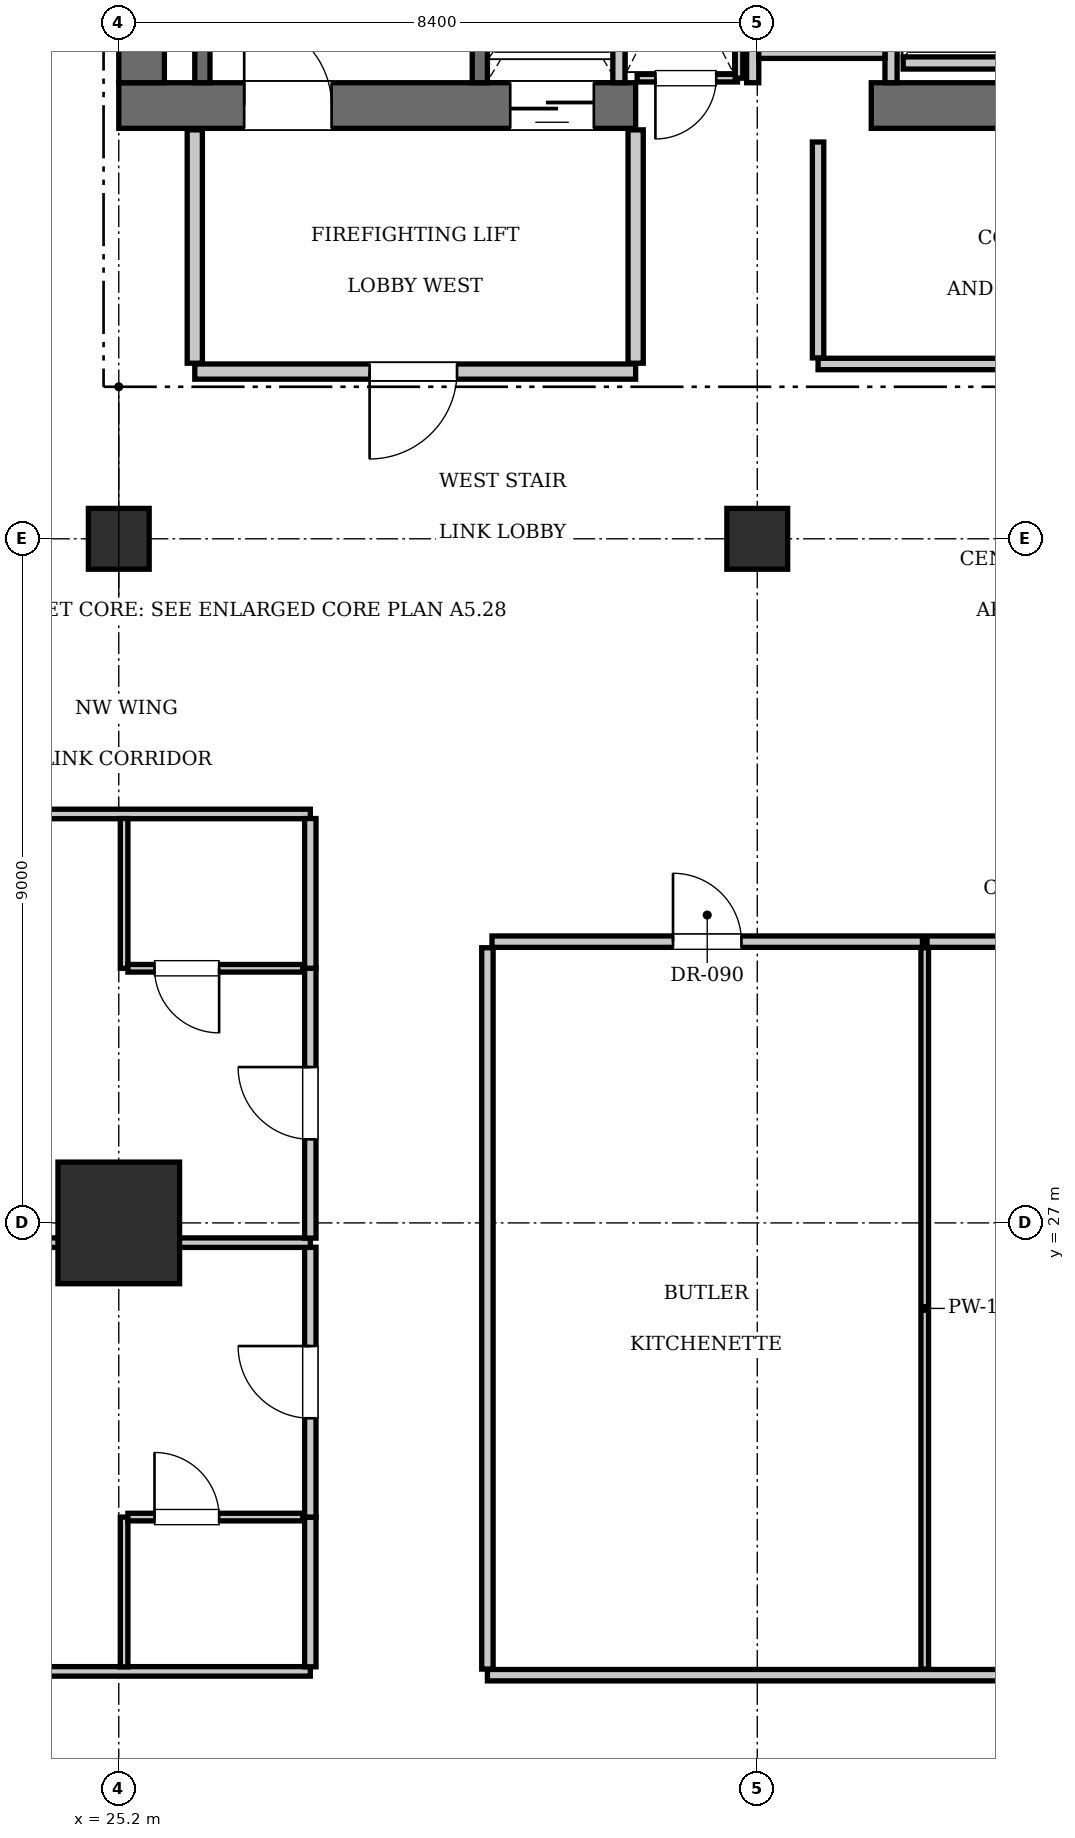
"""IFC4 building model, lengths in metres.
Left out: names, types, materials, properties, quantities, classifications, styles, units other than length and angle.
Written with IfcOpenShell. Run it as: python <this file> out.ifc"""

import sys

from ifc_helpers import new_model, si_unit, direction, frame, frame_2d, origin, origin_2d, place, context, subcontext, project, spatial, rectangle, extrude, element, fill, save


model = new_model("IFC4")
c1 = context("Model", 3, precision=1e-05, world=origin(), true_north=direction((0.0, 1.0)))
c2 = subcontext(c1, "Body", "Model", "MODEL_VIEW")
j1 = project(units=[si_unit("LENGTHUNIT", "METRE"), si_unit("PLANEANGLEUNIT", "RADIAN")], contexts=[c1])
p1 = place(None, origin())
s1 = spatial("IfcSite", under=j1, at=p1, CompositionType="ELEMENT")
p2 = place(p1, origin())
s2 = spatial("IfcBuilding", under=s1, at=p2, CompositionType="ELEMENT")
p3 = place(p2, frame((0.0, 0.0, 247.1)))
s3 = spatial("IfcBuildingStorey", under=s2, at=p3, CompositionType="ELEMENT", Elevation=247.1)
p4 = place(p3, frame((25.2, 27.0, 0.0), z_axis=(0.0, 0.0, 1.0), x_axis=(1.0, 0.0, 0.0)))
e1 = element("IfcColumn", 1, at=p4, inside=s3, PredefinedType="COLUMN", context=c2, shape_type="SweptSolid", body=[
    extrude(rectangle(XDim=1.6, YDim=1.6, at=origin_2d()), origin(), (0.0, 0.0, 1.0), 3.85),
])
p5 = place(p3, frame((25.2, 41.7, 0.0), z_axis=(0.0, 0.0, 1.0), x_axis=(1.0, 0.0, 0.0)))
e2 = element("IfcWall", 2, at=p5, inside=s3, PredefinedType="SHEAR", context=c2, shape_type="SweptSolid", body=[
    extrude(rectangle(XDim=6.8, YDim=0.6, at=frame_2d((3.4, 0.0))), origin(), (0.0, 0.0, 1.0), 3.85),
])
p6 = place(p5, frame((1.65, 0.0, 0.0)))
e3 = element("IfcOpeningElement", 3, at=p6, cuts=e2, PredefinedType="OPENING", context=c2, shape_type="SweptSolid", body=[
    extrude(rectangle(XDim=1.15, YDim=2.15, at=frame_2d((0.575, 1.075))), frame((0.0, 0.31, 0.0), z_axis=(0.0, -1.0, 0.0), x_axis=(1.0, 0.0, 0.0)), (0.0, 0.0, 1.0), 0.62),
])
p7 = place(p5, frame((5.15, 0.0, 0.0)))
e4 = element("IfcOpeningElement", 4, at=p7, cuts=e2, PredefinedType="OPENING", context=c2, shape_type="SweptSolid", body=[
    extrude(rectangle(XDim=1.1, YDim=2.2, at=frame_2d((0.55, 1.1))), frame((0.0, 0.31, 0.0), z_axis=(0.0, -1.0, 0.0), x_axis=(1.0, 0.0, 0.0)), (0.0, 0.0, 1.0), 0.62),
])
p8 = place(p3, frame((35.1, 41.7, 0.0), z_axis=(0.0, 0.0, 1.0), x_axis=(1.0, 0.0, 0.0)))
e5 = element("IfcWall", 5, at=p8, inside=s3, PredefinedType="SHEAR", context=c2, shape_type="SweptSolid", body=[
    extrude(rectangle(XDim=5.4, YDim=0.6, at=frame_2d((2.7, 0.0))), origin(), (0.0, 0.0, 1.0), 3.85),
])
p9 = place(p3, frame((25.5, 42.0, 0.0), z_axis=(0.0, 0.0, 1.0), x_axis=(0.0, 1.0, 0.0)))
e6 = element("IfcWall", 6, at=p9, inside=s3, PredefinedType="SHEAR", context=c2, shape_type="SweptSolid", body=[
    extrude(rectangle(XDim=2.2, YDim=0.6, at=frame_2d((1.1, 0.0))), origin(), (0.0, 0.0, 1.0), 3.85),
])
for number, where, z_axis, x_axis in (
    (7, (25.2, 36.0, 0.0), (0.0, 0.0, 1.0), (1.0, 0.0, 0.0)),
    (8, (33.6, 36.0, 0.0), (0.0, 0.0, 1.0), (1.0, 0.0, 0.0)),
):
    element("IfcColumn", number, at=place(p3, frame(where, z_axis=z_axis, x_axis=x_axis)), inside=s3, PredefinedType="COLUMN", context=c2, shape_type="SweptSolid", body=[
        extrude(rectangle(XDim=0.8, YDim=0.8, at=origin_2d()), origin(), (0.0, 0.0, 1.0), 3.85),
    ])
p10 = place(p3, frame((29.95, 42.0, 0.0), z_axis=(0.0, 0.0, 1.0), x_axis=(0.0, 1.0, 0.0)))
e9 = element("IfcWall", 9, at=p10, inside=s3, PredefinedType="SOLIDWALL", context=c2, shape_type="SweptSolid", body=[
    extrude(rectangle(XDim=9.15, YDim=0.2, at=frame_2d((4.575, 0.0))), origin(), (0.0, 0.0, 1.0), 3.61),
])
p11 = place(p3, frame((26.3, 42.0, 0.0), z_axis=(0.0, 0.0, 1.0), x_axis=(0.0, 1.0, 0.0)))
e10 = element("IfcWall", 10, at=p11, inside=s3, PredefinedType="SOLIDWALL", context=c2, shape_type="SweptSolid", body=[
    extrude(rectangle(XDim=9.12, YDim=0.2, at=frame_2d((4.56, 0.0))), origin(), (0.0, 0.0, 1.0), 3.61),
])
p12 = place(p3, frame((31.78, 42.0, 0.0), z_axis=(0.0, 0.0, 1.0), x_axis=(0.0, 1.0, 0.0)))
e11 = element("IfcWall", 11, at=p12, inside=s3, PredefinedType="SOLIDWALL", context=c2, shape_type="SweptSolid", body=[
    extrude(rectangle(XDim=2.74, YDim=0.16, at=frame_2d((1.37, 0.0))), origin(), (0.0, 0.0, 1.0), 3.61),
])
p13 = place(p3, frame((35.52, 42.26, 0.0), z_axis=(0.0, 0.0, 1.0), x_axis=(1.0, 0.0, 0.0)))
e12 = element("IfcWall", 12, at=p13, inside=s3, PredefinedType="SOLIDWALL", context=c2, shape_type="SweptSolid", body=[
    extrude(rectangle(XDim=5.02, YDim=0.16, at=frame_2d((2.51, 0.0))), origin(), (0.0, 0.0, 1.0), 3.61),
])
for number, where, z_axis, x_axis in (
    (13, (33.54, 42.0, 0.0), (0.0, 0.0, 1.0), (0.0, 1.0, 0.0)),
    (14, (35.36, 42.0, 0.0), (0.0, 0.0, 1.0), (0.0, 1.0, 0.0)),
):
    element("IfcWall", number, at=place(p3, frame(where, z_axis=z_axis, x_axis=x_axis)), inside=s3, PredefinedType="SOLIDWALL", context=c2, shape_type="SweptSolid", body=[
        extrude(rectangle(XDim=2.4, YDim=0.16, at=frame_2d((1.2, 0.0))), origin(), (0.0, 0.0, 1.0), 3.61),
    ])
p14 = place(p3, frame((33.62, 42.4, 0.0), z_axis=(0.0, 0.0, 1.0), x_axis=(1.0, 0.0, 0.0)))
e15 = element("IfcWall", 15, at=p14, inside=s3, PredefinedType="SOLIDWALL", context=c2, shape_type="SweptSolid", body=[
    extrude(rectangle(XDim=1.66, YDim=0.16, at=frame_2d((0.83, 0.0))), origin(), (0.0, 0.0, 1.0), 3.61),
])
p15 = place(p3, frame((26.2, 38.2, 0.0), z_axis=(0.0, 0.0, 1.0), x_axis=(1.0, 0.0, 0.0)))
e16 = element("IfcWall", 16, at=p15, inside=s3, PredefinedType="PARTITIONING", context=c2, shape_type="SweptSolid", body=[
    extrude(rectangle(XDim=5.8, YDim=0.2, at=frame_2d((2.9, 0.0))), origin(), (0.0, 0.0, 1.0), 3.61),
])
p16 = place(p15, frame((2.3, 0.0, 0.0)))
e17 = element("IfcOpeningElement", 17, at=p16, cuts=e16, PredefinedType="OPENING", context=c2, shape_type="SweptSolid", body=[
    extrude(rectangle(XDim=1.15, YDim=2.15, at=frame_2d((0.575, 1.075))), frame((0.0, 0.11, 0.0), z_axis=(0.0, -1.0, 0.0), x_axis=(1.0, 0.0, 0.0)), (0.0, 0.0, 1.0), 0.22),
])
for number, where, z_axis, x_axis in (
    (18, (26.2, 38.31, 0.0), (0.0, 0.0, 1.0), (0.0, 1.0, 0.0)),
    (19, (32.0, 38.31, 0.0), (0.0, 0.0, 1.0), (0.0, 1.0, 0.0)),
):
    element("IfcWall", number, at=place(p3, frame(where, z_axis=z_axis, x_axis=x_axis)), inside=s3, PredefinedType="PARTITIONING", context=c2, shape_type="SweptSolid", body=[
        extrude(rectangle(XDim=3.07, YDim=0.2, at=frame_2d((1.535, 0.0))), origin(), (0.0, 0.0, 1.0), 3.61),
    ])
p17 = place(p3, frame((32.02, 42.06, 0.0), z_axis=(0.0, 0.0, 1.0), x_axis=(1.0, 0.0, 0.0)))
e20 = element("IfcWall", 20, at=p17, inside=s3, PredefinedType="PARTITIONING", context=c2, shape_type="SweptSolid", body=[
    extrude(rectangle(XDim=1.32, YDim=0.1, at=frame_2d((0.66, 0.0))), origin(), (0.0, 0.0, 1.0), 3.61),
])
p18 = place(p17, frame((0.24, 0.0, 0.0)))
e21 = element("IfcOpeningElement", 21, at=p18, cuts=e20, PredefinedType="OPENING", context=c2, shape_type="SweptSolid", body=[
    extrude(rectangle(XDim=0.8, YDim=2.05, at=frame_2d((0.4, 1.025))), frame((0.0, 0.06, 0.0), z_axis=(0.0, -1.0, 0.0), x_axis=(1.0, 0.0, 0.0)), (0.0, 0.0, 1.0), 0.12),
])
p19 = place(p3, frame((33.36, 42.06, 0.0), z_axis=(0.0, 0.0, 1.0), x_axis=(0.0, 1.0, 0.0)))
e22 = element("IfcWall", 22, at=p19, inside=s3, PredefinedType="PARTITIONING", context=c2, shape_type="SweptSolid", body=[
    extrude(rectangle(XDim=2.88, YDim=0.1, at=frame_2d((1.44, 0.0))), origin(), (0.0, 0.0, 1.0), 3.61),
])
p20 = place(p3, frame((34.4, 38.3, 0.0), z_axis=(0.0, 0.0, 1.0), x_axis=(1.0, 0.0, 0.0)))
e23 = element("IfcWall", 23, at=p20, inside=s3, PredefinedType="PARTITIONING", context=c2, shape_type="SweptSolid", body=[
    extrude(rectangle(XDim=5.92, YDim=0.15, at=frame_2d((2.96, 0.0))), origin(), (0.0, 0.0, 1.0), 3.61),
])
p21 = place(p20, frame((2.4, 0.0, 0.0)))
e24 = element("IfcOpeningElement", 24, at=p21, cuts=e23, PredefinedType="OPENING", context=c2, shape_type="SweptSolid", body=[
    extrude(rectangle(XDim=0.9, YDim=2.1, at=frame_2d((0.45, 1.05))), frame((0.0, 0.085, 0.0), z_axis=(0.0, -1.0, 0.0), x_axis=(1.0, 0.0, 0.0)), (0.0, 0.0, 1.0), 0.17),
])
p22 = place(p3, frame((34.4, 38.38, 0.0), z_axis=(0.0, 0.0, 1.0), x_axis=(0.0, 1.0, 0.0)))
e25 = element("IfcWall", 25, at=p22, inside=s3, PredefinedType="PARTITIONING", context=c2, shape_type="SweptSolid", body=[
    extrude(rectangle(XDim=2.84, YDim=0.15, at=frame_2d((1.42, 0.0))), origin(), (0.0, 0.0, 1.0), 3.61),
])
p23 = place(p3, frame((30.05, 21.05, 0.0), z_axis=(0.0, 0.0, 1.0), x_axis=(1.0, 0.0, 0.0)))
e26 = element("IfcWall", 26, at=p23, inside=s3, PredefinedType="PARTITIONING", context=c2, shape_type="SweptSolid", body=[
    extrude(rectangle(XDim=15.55, YDim=0.15, at=frame_2d((7.775, 0.0))), origin(), (0.0, 0.0, 1.0), 3.61),
])
p24 = place(p3, frame((30.05, 21.13, 0.0), z_axis=(0.0, 0.0, 1.0), x_axis=(0.0, 1.0, 0.0)))
e27 = element("IfcWall", 27, at=p24, inside=s3, PredefinedType="PARTITIONING", context=c2, shape_type="SweptSolid", body=[
    extrude(rectangle(XDim=9.49, YDim=0.15, at=frame_2d((4.745, 0.0))), origin(), (0.0, 0.0, 1.0), 3.61),
])
p25 = place(p3, frame((30.11, 30.7, 0.0), z_axis=(0.0, 0.0, 1.0), x_axis=(1.0, 0.0, 0.0)))
e28 = element("IfcWall", 28, at=p25, inside=s3, PredefinedType="PARTITIONING", context=c2, shape_type="SweptSolid", body=[
    extrude(rectangle(XDim=5.663, YDim=0.15, at=frame_2d((2.832, 0.0))), origin(), (0.0, 0.0, 1.0), 3.61),
])
p26 = place(p25, frame((2.382, 0.0, 0.0)))
e29 = element("IfcOpeningElement", 29, at=p26, cuts=e28, PredefinedType="OPENING", context=c2, shape_type="SweptSolid", body=[
    extrude(rectangle(XDim=0.9, YDim=2.1, at=frame_2d((0.45, 1.05))), frame((0.0, 0.085, 0.0), z_axis=(0.0, -1.0, 0.0), x_axis=(1.0, 0.0, 0.0)), (0.0, 0.0, 1.0), 0.17),
])
p27 = place(p3, frame((35.803, 21.13, 0.0), z_axis=(0.0, 0.0, 1.0), x_axis=(0.0, 1.0, 0.0)))
e30 = element("IfcWall", 30, at=p27, inside=s3, PredefinedType="PARTITIONING", context=c2, shape_type="SweptSolid", body=[
    extrude(rectangle(XDim=9.49, YDim=0.1, at=frame_2d((4.745, 0.0))), origin(), (0.0, 0.0, 1.0), 3.61),
])
p28 = place(p3, frame((35.833, 30.7, 0.0), z_axis=(0.0, 0.0, 1.0), x_axis=(1.0, 0.0, 0.0)))
e31 = element("IfcWall", 31, at=p28, inside=s3, PredefinedType="PARTITIONING", context=c2, shape_type="SweptSolid", body=[
    extrude(rectangle(XDim=9.707, YDim=0.15, at=frame_2d((4.853, 0.0))), origin(), (0.0, 0.0, 1.0), 3.61),
])
p29 = place(p28, frame((4.403, 0.0, 0.0)))
e32 = element("IfcOpeningElement", 32, at=p29, cuts=e31, PredefinedType="OPENING", context=c2, shape_type="SweptSolid", body=[
    extrude(rectangle(XDim=0.9, YDim=2.1, at=frame_2d((0.45, 1.05))), frame((0.0, 0.085, 0.0), z_axis=(0.0, -1.0, 0.0), x_axis=(1.0, 0.0, 0.0)), (0.0, 0.0, 1.0), 0.17),
])
for number, where, z_axis, x_axis in (
    (33, (15.5, 21.1, 0.0), (0.0, 0.0, 1.0), (1.0, 0.0, 0.0)),
    (34, (15.5, 32.38, 0.0), (0.0, 0.0, 1.0), (1.0, 0.0, 0.0)),
):
    element("IfcWall", number, at=place(p3, frame(where, z_axis=z_axis, x_axis=x_axis)), inside=s3, PredefinedType="PARTITIONING", context=c2, shape_type="SweptSolid", body=[
        extrude(rectangle(XDim=12.22, YDim=0.125, at=frame_2d((6.11, 0.0))), origin(), (0.0, 0.0, 1.0), 3.61),
    ])
p30 = place(p3, frame((27.72, 21.16, 0.0), z_axis=(0.0, 0.0, 1.0), x_axis=(0.0, 1.0, 0.0)))
e35 = element("IfcWall", 35, at=p30, inside=s3, PredefinedType="PARTITIONING", context=c2, shape_type="SweptSolid", body=[
    extrude(rectangle(XDim=1.97, YDim=0.15, at=frame_2d((0.985, 0.0))), origin(), (0.0, 0.0, 1.0), 3.61),
])
p31 = place(p3, frame((27.72, 23.13, 0.0), z_axis=(0.0, 0.0, 1.0), x_axis=(0.0, 1.0, 0.0)))
e36 = element("IfcWall", 36, at=p31, inside=s3, PredefinedType="PARTITIONING", context=c2, shape_type="SweptSolid", body=[
    extrude(rectangle(XDim=3.55, YDim=0.15, at=frame_2d((1.775, 0.0))), origin(), (0.0, 0.0, 1.0), 3.61),
])
p32 = place(p31, frame((1.3, 0.0, 0.0)))
e37 = element("IfcOpeningElement", 37, at=p32, cuts=e36, PredefinedType="OPENING", context=c2, shape_type="SweptSolid", body=[
    extrude(rectangle(XDim=0.95, YDim=2.15, at=frame_2d((0.475, 1.075))), frame((0.0, 0.085, 0.0), z_axis=(0.0, -1.0, 0.0), x_axis=(1.0, 0.0, 0.0)), (0.0, 0.0, 1.0), 0.17),
])
p33 = place(p3, frame((25.27, 21.16, 0.0), z_axis=(0.0, 0.0, 1.0), x_axis=(0.0, 1.0, 0.0)))
e38 = element("IfcWall", 38, at=p33, inside=s3, PredefinedType="PARTITIONING", context=c2, shape_type="SweptSolid", body=[
    extrude(rectangle(XDim=1.97, YDim=0.1, at=frame_2d((0.985, 0.0))), origin(), (0.0, 0.0, 1.0), 3.077),
])
p34 = place(p3, frame((25.32, 23.13, 0.0), z_axis=(0.0, 0.0, 1.0), x_axis=(1.0, 0.0, 0.0)))
e39 = element("IfcWall", 39, at=p34, inside=s3, PredefinedType="PARTITIONING", context=c2, shape_type="SweptSolid", body=[
    extrude(rectangle(XDim=2.3, YDim=0.1, at=frame_2d((1.15, 0.0))), origin(), (0.0, 0.0, 1.0), 3.61),
])
p35 = place(p34, frame((0.35, 0.0, 0.0)))
e40 = element("IfcOpeningElement", 40, at=p35, cuts=e39, PredefinedType="OPENING", context=c2, shape_type="SweptSolid", body=[
    extrude(rectangle(XDim=0.85, YDim=2.1, at=frame_2d((0.425, 1.05))), frame((0.0, 0.06, 0.0), z_axis=(0.0, -1.0, 0.0), x_axis=(1.0, 0.0, 0.0)), (0.0, 0.0, 1.0), 0.12),
])
p36 = place(p3, frame((15.5, 26.74, 0.0), z_axis=(0.0, 0.0, 1.0), x_axis=(1.0, 0.0, 0.0)))
e41 = element("IfcWall", 41, at=p36, inside=s3, PredefinedType="PARTITIONING", context=c2, shape_type="SweptSolid", body=[
    extrude(rectangle(XDim=12.22, YDim=0.125, at=frame_2d((6.11, 0.0))), origin(), (0.0, 0.0, 1.0), 2.41),
])
p37 = place(p3, frame((27.72, 26.8, 0.0), z_axis=(0.0, 0.0, 1.0), x_axis=(0.0, 1.0, 0.0)))
e42 = element("IfcWall", 42, at=p37, inside=s3, PredefinedType="PARTITIONING", context=c2, shape_type="SweptSolid", body=[
    extrude(rectangle(XDim=3.55, YDim=0.15, at=frame_2d((1.775, 0.0))), origin(), (0.0, 0.0, 1.0), 3.61),
])
p38 = place(p37, frame((1.3, 0.0, 0.0)))
e43 = element("IfcOpeningElement", 43, at=p38, cuts=e42, PredefinedType="OPENING", context=c2, shape_type="SweptSolid", body=[
    extrude(rectangle(XDim=0.95, YDim=2.15, at=frame_2d((0.475, 1.075))), frame((0.0, 0.085, 0.0), z_axis=(0.0, -1.0, 0.0), x_axis=(1.0, 0.0, 0.0)), (0.0, 0.0, 1.0), 0.17),
])
p39 = place(p3, frame((27.72, 30.35, 0.0), z_axis=(0.0, 0.0, 1.0), x_axis=(0.0, 1.0, 0.0)))
e44 = element("IfcWall", 44, at=p39, inside=s3, PredefinedType="PARTITIONING", context=c2, shape_type="SweptSolid", body=[
    extrude(rectangle(XDim=1.97, YDim=0.15, at=frame_2d((0.985, 0.0))), origin(), (0.0, 0.0, 1.0), 3.61),
])
p40 = place(p3, frame((25.27, 30.35, 0.0), z_axis=(0.0, 0.0, 1.0), x_axis=(0.0, 1.0, 0.0)))
e45 = element("IfcWall", 45, at=p40, inside=s3, PredefinedType="PARTITIONING", context=c2, shape_type="SweptSolid", body=[
    extrude(rectangle(XDim=1.97, YDim=0.1, at=frame_2d((0.985, 0.0))), origin(), (0.0, 0.0, 1.0), 3.077),
])
p41 = place(p3, frame((25.32, 30.35, 0.0), z_axis=(0.0, 0.0, 1.0), x_axis=(1.0, 0.0, 0.0)))
e46 = element("IfcWall", 46, at=p41, inside=s3, PredefinedType="PARTITIONING", context=c2, shape_type="SweptSolid", body=[
    extrude(rectangle(XDim=2.3, YDim=0.1, at=frame_2d((1.15, 0.0))), origin(), (0.0, 0.0, 1.0), 3.61),
])
p42 = place(p41, frame((0.35, 0.0, 0.0)))
e47 = element("IfcOpeningElement", 47, at=p42, cuts=e46, PredefinedType="OPENING", context=c2, shape_type="SweptSolid", body=[
    extrude(rectangle(XDim=0.85, YDim=2.1, at=frame_2d((0.425, 1.05))), frame((0.0, 0.06, 0.0), z_axis=(0.0, -1.0, 0.0), x_axis=(1.0, 0.0, 0.0)), (0.0, 0.0, 1.0), 0.12),
])
p43 = place(p6, origin())
e48 = element("IfcDoor", 48, at=p43, inside=s3, OperationType="SINGLE_SWING_LEFT", PredefinedType="DOOR", context=c2, shape_type="SweptSolid", body=[
    extrude(rectangle(XDim=1.15, YDim=2.15, at=frame_2d((0.575, 1.075))), frame((0.0, 0.025, 0.0), z_axis=(0.0, -1.0, 0.0), x_axis=(1.0, 0.0, 0.0)), (0.0, 0.0, 1.0), 0.05),
])
fill(e3, e48)
p44 = place(p7, frame((1.1, 0.0, 0.0), z_axis=(0.0, 0.0, 1.0), x_axis=(-1.0, 0.0, 0.0)))
e49 = element("IfcDoor", 49, at=p44, inside=s3, OperationType="SLIDING_TO_LEFT", PredefinedType="DOOR", context=c2, shape_type="SweptSolid", body=[
    extrude(rectangle(XDim=1.1, YDim=2.2, at=frame_2d((0.55, 1.1))), frame((0.0, 0.025, 0.0), z_axis=(0.0, -1.0, 0.0), x_axis=(1.0, 0.0, 0.0)), (0.0, 0.0, 1.0), 0.05),
])
fill(e4, e49)
p45 = place(p16, frame((1.15, 0.0, 0.0), z_axis=(0.0, 0.0, 1.0), x_axis=(-1.0, 0.0, 0.0)))
e50 = element("IfcDoor", 50, at=p45, inside=s3, OperationType="SINGLE_SWING_RIGHT", PredefinedType="DOOR", context=c2, shape_type="SweptSolid", body=[
    extrude(rectangle(XDim=1.15, YDim=2.15, at=frame_2d((0.575, 1.075))), frame((0.0, 0.025, 0.0), z_axis=(0.0, -1.0, 0.0), x_axis=(1.0, 0.0, 0.0)), (0.0, 0.0, 1.0), 0.05),
])
fill(e17, e50)
p46 = place(p18, frame((0.8, 0.0, 0.0), z_axis=(0.0, 0.0, 1.0), x_axis=(-1.0, 0.0, 0.0)))
e51 = element("IfcDoor", 51, at=p46, inside=s3, OperationType="SINGLE_SWING_RIGHT", PredefinedType="DOOR", context=c2, shape_type="SweptSolid", body=[
    extrude(rectangle(XDim=0.8, YDim=2.05, at=frame_2d((0.4, 1.025))), frame((0.0, 0.025, 0.0), z_axis=(0.0, -1.0, 0.0), x_axis=(1.0, 0.0, 0.0)), (0.0, 0.0, 1.0), 0.05),
])
fill(e21, e51)
p47 = place(p26, origin())
e52 = element("IfcDoor", 52, at=p47, inside=s3, OperationType="SINGLE_SWING_LEFT", PredefinedType="DOOR", context=c2, shape_type="SweptSolid", body=[
    extrude(rectangle(XDim=0.9, YDim=2.1, at=frame_2d((0.45, 1.05))), frame((0.0, 0.025, 0.0), z_axis=(0.0, -1.0, 0.0), x_axis=(1.0, 0.0, 0.0)), (0.0, 0.0, 1.0), 0.05),
])
fill(e29, e52)
p48 = place(p35, origin())
e53 = element("IfcDoor", 53, at=p48, inside=s3, OperationType="SINGLE_SWING_LEFT", PredefinedType="DOOR", context=c2, shape_type="SweptSolid", body=[
    extrude(rectangle(XDim=0.85, YDim=2.1, at=frame_2d((0.425, 1.05))), frame((0.0, 0.025, 0.0), z_axis=(0.0, -1.0, 0.0), x_axis=(1.0, 0.0, 0.0)), (0.0, 0.0, 1.0), 0.05),
])
fill(e40, e53)
p49 = place(p32, origin())
e54 = element("IfcDoor", 54, at=p49, inside=s3, OperationType="SINGLE_SWING_RIGHT", PredefinedType="DOOR", context=c2, shape_type="SweptSolid", body=[
    extrude(rectangle(XDim=0.95, YDim=2.15, at=frame_2d((0.475, 1.075))), frame((0.0, 0.025, 0.0), z_axis=(0.0, -1.0, 0.0), x_axis=(1.0, 0.0, 0.0)), (0.0, 0.0, 1.0), 0.05),
])
fill(e37, e54)
p50 = place(p42, frame((0.85, 0.0, 0.0), z_axis=(0.0, 0.0, 1.0), x_axis=(-1.0, 0.0, 0.0)))
e55 = element("IfcDoor", 55, at=p50, inside=s3, OperationType="SINGLE_SWING_LEFT", PredefinedType="DOOR", context=c2, shape_type="SweptSolid", body=[
    extrude(rectangle(XDim=0.85, YDim=2.1, at=frame_2d((0.425, 1.05))), frame((0.0, 0.025, 0.0), z_axis=(0.0, -1.0, 0.0), x_axis=(1.0, 0.0, 0.0)), (0.0, 0.0, 1.0), 0.05),
])
fill(e47, e55)
p51 = place(p38, origin())
e56 = element("IfcDoor", 56, at=p51, inside=s3, OperationType="SINGLE_SWING_RIGHT", PredefinedType="DOOR", context=c2, shape_type="SweptSolid", body=[
    extrude(rectangle(XDim=0.95, YDim=2.15, at=frame_2d((0.475, 1.075))), frame((0.0, 0.025, 0.0), z_axis=(0.0, -1.0, 0.0), x_axis=(1.0, 0.0, 0.0)), (0.0, 0.0, 1.0), 0.05),
])
fill(e43, e56)
save(model, sys.argv[1])
